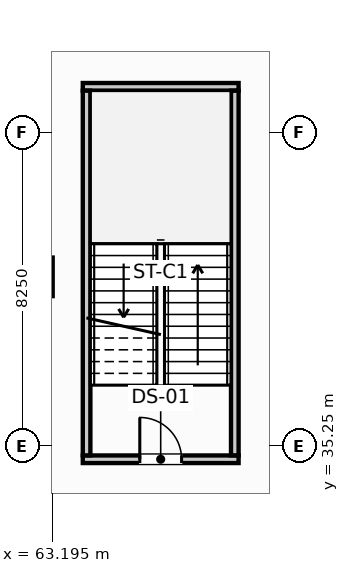
"""IFC4 building model, lengths in metres.
Left out: names, types, materials, properties, quantities, classifications, styles, units other than length and angle.
Written with IfcOpenShell. Run it as: python <this file> out.ifc"""

import sys

from ifc_helpers import new_model, si_unit, direction, frame, frame_2d, origin, origin_2d, place, context, subcontext, project, spatial, rectangle, extrude, element, fill, save


model = new_model("IFC4")
c1 = context("Model", 3, precision=1e-05, world=origin(), true_north=direction((0.0, 1.0)))
c2 = subcontext(c1, "Body", "Model", "MODEL_VIEW")
j1 = project(units=[si_unit("LENGTHUNIT", "METRE"), si_unit("PLANEANGLEUNIT", "RADIAN")], contexts=[c1])
p1 = place(None, origin())
s1 = spatial("IfcSite", under=j1, at=p1, CompositionType="ELEMENT")
p2 = place(p1, origin())
s2 = spatial("IfcBuilding", under=s1, at=p2, CompositionType="ELEMENT")
p3 = place(p2, frame((0.0, 0.0, -13.5)))
s3 = spatial("IfcBuildingStorey", under=s2, at=p3, CompositionType="ELEMENT", Elevation=-13.5)
p4 = place(p3, frame((62.7, 39.7, -0.5), z_axis=(0.0, 0.0, 1.0), x_axis=(1.0, 0.0, 0.0)))
e1 = element("IfcColumn", 1, at=p4, inside=s3, PredefinedType="COLUMN", context=c2, shape_type="SweptSolid", body=[
    extrude(rectangle(XDim=1.05, YDim=1.05, at=origin_2d()), origin(), (0.0, 0.0, 1.0), 4.68),
])
p5 = place(p3, frame((64.0, 34.9, -0.5), z_axis=(0.0, 0.0, 1.0), x_axis=(1.0, 0.0, 0.0)))
e2 = element("IfcWall", 2, at=p5, inside=s3, PredefinedType="SHEAR", context=c2, shape_type="SweptSolid", body=[
    extrude(rectangle(XDim=4.1, YDim=0.2, at=frame_2d((2.05, 0.0))), origin(), (0.0, 0.0, 1.0), 4.68),
])
p6 = place(p5, frame((1.5, 0.0, 0.5)))
e3 = element("IfcOpeningElement", 3, at=p6, cuts=e2, PredefinedType="OPENING", context=c2, shape_type="SweptSolid", body=[
    extrude(rectangle(XDim=1.1, YDim=2.15, at=frame_2d((0.55, 1.075))), frame((0.0, 0.11, 0.0), z_axis=(0.0, -1.0, 0.0), x_axis=(1.0, 0.0, 0.0)), (0.0, 0.0, 1.0), 0.22),
])
p7 = place(p3, frame((64.0, 44.7, -0.5), z_axis=(0.0, 0.0, 1.0), x_axis=(1.0, 0.0, 0.0)))
e4 = element("IfcWall", 4, at=p7, inside=s3, PredefinedType="SHEAR", context=c2, shape_type="SweptSolid", body=[
    extrude(rectangle(XDim=4.1, YDim=0.2, at=frame_2d((2.05, 0.0))), origin(), (0.0, 0.0, 1.0), 4.68),
])
for number, where, z_axis, x_axis in (
    (5, (64.1, 35.002, -0.5), (0.0, 0.0, 1.0), (0.0, 1.0, 0.0)),
    (6, (68.0, 35.002, -0.5), (0.0, 0.0, 1.0), (0.0, 1.0, 0.0)),
):
    element("IfcWall", number, at=place(p3, frame(where, z_axis=z_axis, x_axis=x_axis)), inside=s3, PredefinedType="SHEAR", context=c2, shape_type="SweptSolid", body=[
        extrude(rectangle(XDim=9.596, YDim=0.2, at=frame_2d((4.798, 0.0))), origin(), (0.0, 0.0, 1.0), 4.68),
    ])
p8 = place(p6, origin())
e7 = element("IfcDoor", 7, at=p8, inside=s3, OperationType="SINGLE_SWING_LEFT", PredefinedType="DOOR", context=c2, shape_type="SweptSolid", body=[
    extrude(rectangle(XDim=1.1, YDim=2.15, at=frame_2d((0.55, 1.075))), frame((0.0, 0.025, 0.0), z_axis=(0.0, -1.0, 0.0), x_axis=(1.0, 0.0, 0.0)), (0.0, 0.0, 1.0), 0.05),
])
fill(e3, e7)
save(model, sys.argv[1])
